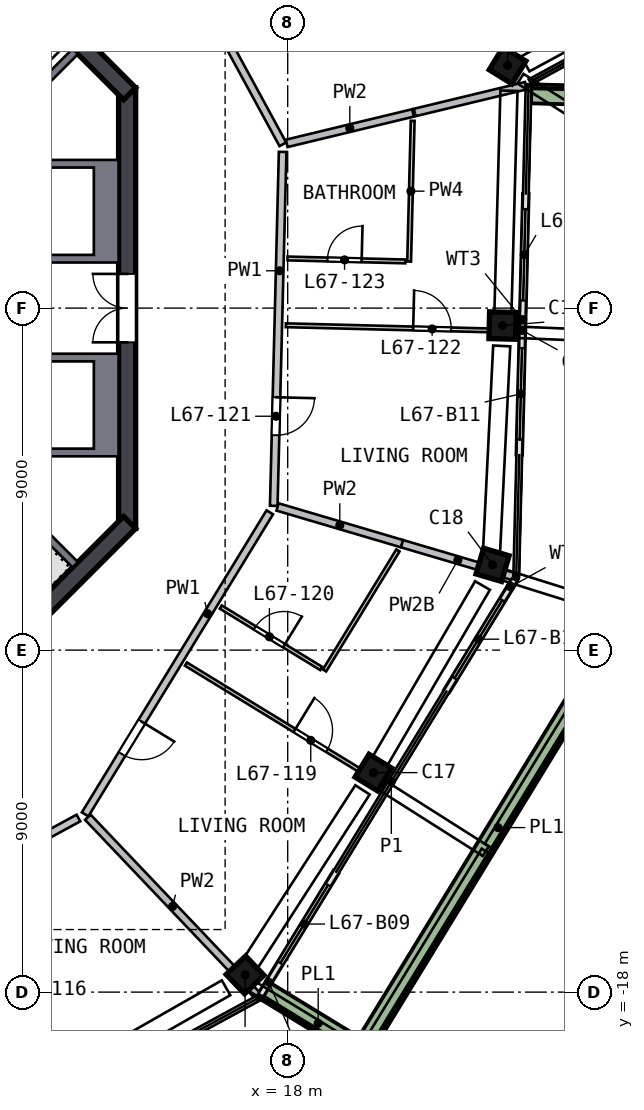
"""IFC4 building model, lengths in metres.
Left out: names, types, materials, properties, quantities, classifications, styles, units other than length and angle.
Written with IfcOpenShell. Run it as: python <this file> out.ifc"""

import sys

from ifc_helpers import new_model, si_unit, direction, frame, frame_2d, origin, origin_2d, place, context, subcontext, project, spatial, polyline, rectangle, outline, extrude, element, fill, save


model = new_model("IFC4")
c1 = context("Model", 3, precision=1e-05, world=origin(), true_north=direction((0.0, 1.0)))
c2 = subcontext(c1, "Body", "Model", "MODEL_VIEW")
j1 = project(units=[si_unit("LENGTHUNIT", "METRE"), si_unit("PLANEANGLEUNIT", "RADIAN")], contexts=[c1])
p1 = place(None, origin())
s1 = spatial("IfcSite", under=j1, at=p1, CompositionType="ELEMENT")
p2 = place(p1, origin())
s2 = spatial("IfcBuilding", under=s1, at=p2, CompositionType="ELEMENT")
p3 = place(p2, frame((0.0, 0.0, 274.0)))
s3 = spatial("IfcBuildingStorey", under=s2, at=p3, CompositionType="ELEMENT", Elevation=274.0)
p4 = place(p3, frame((16.779, -17.644, 0.0), z_axis=(0.083241987, 0.080429245, 0.993278364), x_axis=(-0.720153088, -0.684092384, 0.115746011)))
e1 = element("IfcColumn", 1, at=p4, inside=s3, PredefinedType="COLUMN", context=c2, shape_type="SweptSolid", body=[
    extrude(rectangle(XDim=0.7, YDim=0.7, at=origin_2d()), origin(), (0.0, 0.0, 1.0), 3.211),
])
p5 = place(p3, frame((20.185, -12.34, 0.0), z_axis=(0.057872841, 0.096505434, 0.993648547), x_axis=(0.518243304, 0.847798451, -0.112524062)))
e2 = element("IfcColumn", 2, at=p5, inside=s3, PredefinedType="COLUMN", context=c2, shape_type="SweptSolid", body=[
    extrude(rectangle(XDim=0.7, YDim=0.7, at=origin_2d()), origin(), (0.0, 0.0, 1.0), 3.21),
])
p6 = place(p3, frame((23.353, -6.891, 0.0), z_axis=(0.03185237, 0.111293246, 0.993277021), x_axis=(-0.281402991, -0.952582043, 0.115757536)))
e3 = element("IfcColumn", 3, at=p6, inside=s3, PredefinedType="COLUMN", context=c2, shape_type="SweptSolid", body=[
    extrude(rectangle(XDim=0.7, YDim=0.7, at=origin_2d()), origin(), (0.0, 0.0, 1.0), 3.211),
])
p7 = place(p3, frame((23.651, -0.594, 0.0), z_axis=(0.001901218, 0.112476061, 0.993652616), x_axis=(0.025223407, 0.993332875, -0.11248813)))
e4 = element("IfcColumn", 4, at=p7, inside=s3, PredefinedType="COLUMN", context=c2, shape_type="SweptSolid", body=[
    extrude(rectangle(XDim=0.7, YDim=0.7, at=origin_2d()), origin(), (0.0, 0.0, 1.0), 3.21),
])
p8 = place(p3, frame((23.823, 6.25, 0.0), z_axis=(-0.030707144, 0.113023573, 0.993117689), x_axis=(-0.525479684, -0.847022559, 0.080149147)))
e5 = element("IfcColumn", 5, at=p8, inside=s3, PredefinedType="COLUMN", context=c2, shape_type="SweptSolid", body=[
    extrude(rectangle(XDim=0.7, YDim=0.7, at=origin_2d()), origin(), (0.0, 0.0, 1.0), 3.212),
])
p9 = place(p3, frame((13.775, -5.799, 0.0), z_axis=(0.0, 0.0, 1.0), x_axis=(0.0, 1.0, 0.0)))
e6 = element("IfcWall", 6, at=p9, inside=s3, PredefinedType="SHEAR", context=c2, shape_type="SweptSolid", body=[
    extrude(rectangle(XDim=11.598, YDim=0.45, at=frame_2d((5.799, 0.0))), origin(), (0.0, 0.0, 1.0), 3.5),
])
p10 = place(p9, frame((4.899, 0.0, 0.0)))
e7 = element("IfcOpeningElement", 7, at=p10, cuts=e6, PredefinedType="OPENING", context=c2, shape_type="SweptSolid", body=[
    extrude(rectangle(XDim=1.8, YDim=2.1, at=frame_2d((0.9, 1.05))), frame((0.0, 0.235, 0.0), z_axis=(0.0, -1.0, 0.0), x_axis=(1.0, 0.0, 0.0)), (0.0, 0.0, 1.0), 0.47),
])
p11 = place(p3, frame((13.841, 5.64, 0.0), z_axis=(0.0, 0.0, 1.0), x_axis=(-0.707106781, 0.707106781, 0.0)))
e8 = element("IfcWall", 8, at=p11, inside=s3, PredefinedType="SHEAR", context=c2, shape_type="SweptSolid", body=[
    extrude(rectangle(XDim=11.598, YDim=0.45, at=frame_2d((5.799, 0.0))), origin(), (0.0, 0.0, 1.0), 3.5),
])
p12 = place(p11, frame((2.099, 0.0, 0.0)))
e9 = element("IfcOpeningElement", 9, at=p12, cuts=e8, PredefinedType="OPENING", context=c2, shape_type="SweptSolid", body=[
    extrude(rectangle(XDim=1.2, YDim=2.1, at=frame_2d((0.6, 1.05))), frame((0.0, 0.235, 0.0), z_axis=(0.0, -1.0, 0.0), x_axis=(1.0, 0.0, 0.0)), (0.0, 0.0, 1.0), 0.47),
])
p13 = place(p3, frame((5.64, -13.841, 0.0), z_axis=(0.0, 0.0, 1.0), x_axis=(0.707106781, 0.707106781, 0.0)))
e10 = element("IfcWall", 10, at=p13, inside=s3, PredefinedType="SHEAR", context=c2, shape_type="SweptSolid", body=[
    extrude(rectangle(XDim=11.598, YDim=0.45, at=frame_2d((5.799, 0.0))), origin(), (0.0, 0.0, 1.0), 3.5),
])
p14 = place(p13, frame((2.099, 0.0, 0.0)))
e11 = element("IfcOpeningElement", 11, at=p14, cuts=e10, PredefinedType="OPENING", context=c2, shape_type="SweptSolid", body=[
    extrude(rectangle(XDim=1.2, YDim=2.1, at=frame_2d((0.6, 1.05))), frame((0.0, 0.235, 0.0), z_axis=(0.0, -1.0, 0.0), x_axis=(1.0, 0.0, 0.0)), (0.0, 0.0, 1.0), 0.47),
])
p15 = place(p3, frame((17.295, -18.074, 0.0), z_axis=(0.0, 0.0, 1.0), x_axis=(0.521598655, 0.853190977, 0.0)))
e12 = element("IfcWall", 12, at=p15, inside=s3, PredefinedType="SOLIDWALL", context=c2, shape_type="SweptSolid", body=[
    extrude(rectangle(XDim=3.787, YDim=0.15, at=frame_2d((1.893, 0.0))), origin(), (0.0, 0.0, 1.0), 2.525),
])
p16 = place(p15, frame((0.987, 0.0, 0.0)))
e13 = element("IfcOpeningElement", 13, at=p16, cuts=e12, PredefinedType="OPENING", context=c2, shape_type="SweptSolid", body=[
    extrude(rectangle(XDim=2.4, YDim=2.4, at=frame_2d((1.2, 1.2))), frame((0.0, 0.085, 0.0), z_axis=(0.0, -1.0, 0.0), x_axis=(1.0, 0.0, 0.0)), (0.0, 0.0, 1.0), 0.17),
])
p17 = place(p3, frame((22.184, -10.078, 0.0), z_axis=(0.0, 0.0, 1.0), x_axis=(0.521622897, 0.853176156, 0.0)))
e14 = element("IfcWall", 14, at=p17, inside=s3, PredefinedType="SOLIDWALL", context=c2, shape_type="SweptSolid", body=[
    extrude(rectangle(XDim=3.427, YDim=0.15, at=frame_2d((1.713, 0.0))), origin(), (0.0, 0.0, 1.0), 2.525),
])
p18 = place(p17, frame((0.4, 0.0, 0.0)))
e15 = element("IfcOpeningElement", 15, at=p18, cuts=e14, PredefinedType="OPENING", context=c2, shape_type="SweptSolid", body=[
    extrude(rectangle(XDim=2.4, YDim=2.4, at=frame_2d((1.2, 1.2))), frame((0.0, 0.085, 0.0), z_axis=(0.0, -1.0, 0.0), x_axis=(1.0, 0.0, 0.0)), (0.0, 0.0, 1.0), 0.17),
])
p19 = place(p3, frame((24.094, -3.857, 0.0), z_axis=(0.0, 0.0, 1.0), x_axis=(0.025164857, 0.999683315, 0.0)))
e16 = element("IfcWall", 16, at=p19, inside=s3, PredefinedType="SOLIDWALL", context=c2, shape_type="SweptSolid", body=[
    extrude(rectangle(XDim=3.25, YDim=0.15, at=frame_2d((1.625, 0.0))), origin(), (0.0, 0.0, 1.0), 2.525),
])
p20 = place(p19, frame((0.4, 0.0, 0.0)))
e17 = element("IfcOpeningElement", 17, at=p20, cuts=e16, PredefinedType="OPENING", context=c2, shape_type="SweptSolid", body=[
    extrude(rectangle(XDim=2.4, YDim=2.4, at=frame_2d((1.2, 1.2))), frame((0.0, 0.085, 0.0), z_axis=(0.0, -1.0, 0.0), x_axis=(1.0, 0.0, 0.0)), (0.0, 0.0, 1.0), 0.17),
])
p21 = place(p3, frame((24.176, -0.608, 0.0), z_axis=(0.0, 0.0, 1.0), x_axis=(0.025081713, 0.999685404, 0.0)))
e18 = element("IfcWall", 18, at=p21, inside=s3, PredefinedType="SOLIDWALL", context=c2, shape_type="SweptSolid", body=[
    extrude(rectangle(XDim=3.611, YDim=0.15, at=frame_2d((1.806, 0.0))), origin(), (0.0, 0.0, 1.0), 2.525),
])
p22 = place(p21, frame((0.811, 0.0, 0.0)))
e19 = element("IfcOpeningElement", 19, at=p22, cuts=e18, PredefinedType="OPENING", context=c2, shape_type="SweptSolid", body=[
    extrude(rectangle(XDim=2.4, YDim=2.4, at=frame_2d((1.2, 1.2))), frame((0.0, 0.085, 0.0), z_axis=(0.0, -1.0, 0.0), x_axis=(1.0, 0.0, 0.0)), (0.0, 0.0, 1.0), 0.17),
])
p23 = place(p3, frame((17.438, -17.986, 0.0), z_axis=(0.0, 0.0, 1.0), x_axis=(0.853200699, -0.521582752, 0.0)))
e20 = element("IfcWall", 20, at=p23, inside=s3, PredefinedType="SOLIDWALL", context=c2, shape_type="SweptSolid", body=[
    extrude(rectangle(XDim=3.199, YDim=0.5, at=frame_2d((1.599, 0.0))), origin(), (0.0, 0.0, 1.0), 0.7),
])
p24 = place(p3, frame((20.084, -19.311, 0.0), z_axis=(0.0, 0.0, 1.0), x_axis=(0.521610564, 0.853183696, 0.0)))
e21 = element("IfcWall", 21, at=p24, inside=s3, PredefinedType="SOLIDWALL", context=c2, shape_type="SweptSolid", body=[
    extrude(rectangle(XDim=13.223, YDim=0.5, at=frame_2d((6.612, 0.0))), origin(), (0.0, 0.0, 1.0), 0.7),
])
p25 = place(p3, frame((27.107, 5.571, 0.0), z_axis=(0.0, 0.0, 1.0), x_axis=(-0.999683793, 0.025145864, 0.0)))
e22 = element("IfcWall", 22, at=p25, inside=s3, PredefinedType="SOLIDWALL", context=c2, shape_type="SweptSolid", body=[
    extrude(rectangle(XDim=2.699, YDim=0.5, at=frame_2d((1.35, 0.0))), origin(), (0.0, 0.0, 1.0), 0.7),
])
p26 = place(p3, origin())
e23 = element("IfcWall", 23, at=p26, inside=s3, PredefinedType="SOLIDWALL", context=c2, shape_type="SweptSolid", body=[
    extrude(outline(polyline([(13.55, -3.9), (9.9, -3.9), (9.9, -3.7), (12.9, -3.7), (12.9, -1.4), (9.9, -1.4), (9.9, -1.2), (13.55, -1.2), (13.55, -3.9)])), origin(), (0.0, 0.0, 1.0), 3.19),
])
p27 = place(p3, origin())
e24 = element("IfcWall", 24, at=p27, inside=s3, PredefinedType="SOLIDWALL", context=c2, shape_type="SweptSolid", body=[
    extrude(outline(polyline([(13.55, 3.9), (13.55, 1.2), (9.9, 1.2), (9.9, 1.4), (12.9, 1.4), (12.9, 3.7), (9.9, 3.7), (9.9, 3.9), (13.55, 3.9)])), origin(), (0.0, 0.0, 1.0), 3.19),
])
for number, where, z_axis, x_axis in (
    (25, (9.334, 3.677, 0.0), (0.0, 0.0, 1.0), (0.707, 0.707, 0.0)),
    (26, (9.334, -3.677, 0.0), (0.0, 0.0, 1.0), (0.707, -0.707, 0.0)),
):
    element("IfcWall", number, at=place(p3, frame(where, z_axis=z_axis, x_axis=x_axis)), inside=s3, PredefinedType="SOLIDWALL", context=c2, shape_type="SweptSolid", body=[
        extrude(rectangle(XDim=4.35, YDim=0.2, at=frame_2d((2.175, 0.0))), origin(), (0.0, 0.0, 1.0), 3.19),
    ])
p28 = place(p3, frame((12.493, -13.418, 0.0), z_axis=(0.0, 0.0, 1.0), x_axis=(-0.878320972, -0.478071407, 0.0)))
e27 = element("IfcWall", 27, at=p28, inside=s3, PredefinedType="SOLIDWALL", context=c2, shape_type="SweptSolid", body=[
    extrude(rectangle(XDim=9.117, YDim=0.2, at=frame_2d((4.558, 0.0))), origin(), (0.0, 0.0, 1.0), 3.19),
])
p29 = place(p28, frame((1.7, 0.0, 0.0)))
e28 = element("IfcOpeningElement", 28, at=p29, cuts=e27, PredefinedType="OPENING", context=c2, shape_type="SweptSolid", body=[
    extrude(rectangle(XDim=1.0, YDim=2.1, at=frame_2d((0.5, 1.05))), frame((0.0, 0.11, 0.0), z_axis=(0.0, -1.0, 0.0), x_axis=(1.0, 0.0, 0.0)), (0.0, 0.0, 1.0), 0.22),
])
p30 = place(p3, frame((17.529, -5.374, 0.0), z_axis=(0.0, 0.0, 1.0), x_axis=(-0.521611117, -0.853183358, 0.0)))
e29 = element("IfcWall", 29, at=p30, inside=s3, PredefinedType="SOLIDWALL", context=c2, shape_type="SweptSolid", body=[
    extrude(rectangle(XDim=9.317, YDim=0.2, at=frame_2d((4.658, 0.0))), origin(), (0.0, 0.0, 1.0), 3.19),
])
p31 = place(p30, frame((6.458, 0.0, 0.0)))
e30 = element("IfcOpeningElement", 30, at=p31, cuts=e29, PredefinedType="OPENING", context=c2, shape_type="SweptSolid", body=[
    extrude(rectangle(XDim=1.0, YDim=2.1, at=frame_2d((0.5, 1.05))), frame((0.0, 0.11, 0.0), z_axis=(0.0, -1.0, 0.0), x_axis=(1.0, 0.0, 0.0)), (0.0, 0.0, 1.0), 0.22),
])
p32 = place(p3, frame((13.323, 12.669, 0.0), z_axis=(0.0, 0.0, 1.0), x_axis=(0.478086253, -0.878312891, 0.0)))
e31 = element("IfcWall", 31, at=p32, inside=s3, PredefinedType="SOLIDWALL", context=c2, shape_type="SweptSolid", body=[
    extrude(rectangle(XDim=9.517, YDim=0.2, at=frame_2d((4.758, 0.0))), origin(), (0.0, 0.0, 1.0), 3.19),
])
p33 = place(p32, frame((3.869, 0.0, 0.0)))
e32 = element("IfcOpeningElement", 32, at=p33, cuts=e31, PredefinedType="OPENING", context=c2, shape_type="SweptSolid", body=[
    extrude(rectangle(XDim=1.8, YDim=2.1, at=frame_2d((0.9, 1.05))), frame((0.0, 0.11, 0.0), z_axis=(0.0, -1.0, 0.0), x_axis=(1.0, 0.0, 0.0)), (0.0, 0.0, 1.0), 0.22),
])
p34 = place(p3, frame((17.867, 4.111, 0.0), z_axis=(0.0, 0.0, 1.0), x_axis=(-0.025130335, -0.999684183, 0.0)))
e33 = element("IfcWall", 33, at=p34, inside=s3, PredefinedType="SOLIDWALL", context=c2, shape_type="SweptSolid", body=[
    extrude(rectangle(XDim=9.317, YDim=0.2, at=frame_2d((4.658, 0.0))), origin(), (0.0, 0.0, 1.0), 3.19),
])
p35 = place(p34, frame((6.458, 0.0, 0.0)))
e34 = element("IfcOpeningElement", 34, at=p35, cuts=e33, PredefinedType="OPENING", context=c2, shape_type="SweptSolid", body=[
    extrude(rectangle(XDim=1.0, YDim=2.1, at=frame_2d((0.5, 1.05))), frame((0.0, 0.11, 0.0), z_axis=(0.0, -1.0, 0.0), x_axis=(1.0, 0.0, 0.0)), (0.0, 0.0, 1.0), 0.22),
])
p36 = place(p3, frame((12.74, -13.398, 0.0), z_axis=(0.0, 0.0, 1.0), x_axis=(0.689126869, -0.72464071, 0.0)))
e35 = element("IfcWall", 35, at=p36, inside=s3, PredefinedType="SOLIDWALL", context=c2, shape_type="SweptSolid", body=[
    extrude(rectangle(XDim=6.476, YDim=0.2, at=frame_2d((3.238, 0.0))), origin(), (0.0, 0.0, 1.0), 3.19),
])
p37 = place(p3, frame((17.732, -5.232, 0.0), z_axis=(0.0, 0.0, 1.0), x_axis=(0.959126201, -0.282978674, 0.0)))
e36 = element("IfcWall", 36, at=p37, inside=s3, PredefinedType="SOLIDWALL", context=c2, shape_type="SweptSolid", body=[
    extrude(rectangle(XDim=3.417, YDim=0.2, at=frame_2d((1.708, 0.0))), origin(), (0.0, 0.0, 1.0), 3.19),
])
p38 = place(p3, frame((21.296, 5.136, 0.0), z_axis=(0.0, 0.0, 1.0), x_axis=(-0.972125443, -0.234461345, 0.0)))
e37 = element("IfcWall", 37, at=p38, inside=s3, PredefinedType="SOLIDWALL", context=c2, shape_type="SweptSolid", body=[
    extrude(rectangle(XDim=3.418, YDim=0.2, at=frame_2d((1.709, 0.0))), origin(), (0.0, 0.0, 1.0), 3.19),
])
p39 = place(p3, frame((21.009, -6.199, 0.0), z_axis=(0.0, 0.0, 1.0), x_axis=(0.959105877, -0.283047553, 0.0)))
e38 = element("IfcWall", 38, at=p39, inside=s3, PredefinedType="SOLIDWALL", context=c2, shape_type="SweptSolid", body=[
    extrude(rectangle(XDim=3.059, YDim=0.2, at=frame_2d((1.53, 0.0))), origin(), (0.0, 0.0, 1.0), 2.69),
])
p40 = place(p3, frame((24.268, 5.853, 0.0), z_axis=(0.0, 0.0, 1.0), x_axis=(-0.972126189, -0.234458255, 0.0)))
e39 = element("IfcWall", 39, at=p40, inside=s3, PredefinedType="SOLIDWALL", context=c2, shape_type="SweptSolid", body=[
    extrude(rectangle(XDim=3.011, YDim=0.2, at=frame_2d((1.506, 0.0))), origin(), (0.0, 0.0, 1.0), 3.19),
])
p41 = place(p3, frame((16.239, -7.867, 0.0), z_axis=(0.0, 0.0, 1.0), x_axis=(0.85318253, -0.521612471, 0.0)))
e40 = element("IfcWall", 40, at=p41, inside=s3, PredefinedType="PARTITIONING", context=c2, shape_type="SweptSolid", body=[
    extrude(rectangle(XDim=3.1, YDim=0.1, at=frame_2d((1.55, 0.0))), origin(), (0.0, 0.0, 1.0), 3.19),
])
p42 = place(p41, frame((1.05, 0.0, 0.0)))
e41 = element("IfcOpeningElement", 41, at=p42, cuts=e40, PredefinedType="OPENING", context=c2, shape_type="SweptSolid", body=[
    extrude(rectangle(XDim=0.9, YDim=2.1, at=frame_2d((0.45, 1.05))), frame((0.0, 0.06, 0.0), z_axis=(0.0, -1.0, 0.0), x_axis=(1.0, 0.0, 0.0)), (0.0, 0.0, 1.0), 0.12),
])
p43 = place(p3, frame((15.322, -9.367, 0.0), z_axis=(0.0, 0.0, 1.0), x_axis=(0.853193504, -0.521594521, 0.0)))
e42 = element("IfcWall", 42, at=p43, inside=s3, PredefinedType="PARTITIONING", context=c2, shape_type="SweptSolid", body=[
    extrude(rectangle(XDim=6.15, YDim=0.1, at=frame_2d((3.075, 0.0))), origin(), (0.0, 0.0, 1.0), 3.19),
])
p44 = place(p43, frame((3.35, 0.0, 0.0)))
e43 = element("IfcOpeningElement", 43, at=p44, cuts=e42, PredefinedType="OPENING", context=c2, shape_type="SweptSolid", body=[
    extrude(rectangle(XDim=1.0, YDim=2.1, at=frame_2d((0.5, 1.05))), frame((0.0, 0.06, 0.0), z_axis=(0.0, -1.0, 0.0), x_axis=(1.0, 0.0, 0.0)), (0.0, 0.0, 1.0), 0.12),
])
p45 = place(p3, frame((17.997, 1.306, 0.0), z_axis=(0.0, 0.0, 1.0), x_axis=(0.999684391, -0.025122051, 0.0)))
e44 = element("IfcWall", 44, at=p45, inside=s3, PredefinedType="PARTITIONING", context=c2, shape_type="SweptSolid", body=[
    extrude(rectangle(XDim=3.1, YDim=0.1, at=frame_2d((1.55, 0.0))), origin(), (0.0, 0.0, 1.0), 3.19),
])
p46 = place(p45, frame((1.05, 0.0, 0.0)))
e45 = element("IfcOpeningElement", 45, at=p46, cuts=e44, PredefinedType="OPENING", context=c2, shape_type="SweptSolid", body=[
    extrude(rectangle(XDim=0.9, YDim=2.1, at=frame_2d((0.45, 1.05))), frame((0.0, 0.06, 0.0), z_axis=(0.0, -1.0, 0.0), x_axis=(1.0, 0.0, 0.0)), (0.0, 0.0, 1.0), 0.12),
])
p47 = place(p3, frame((18.969, -9.536, 0.0), z_axis=(0.0, 0.0, 1.0), x_axis=(0.521583314, 0.853200356, 0.0)))
e46 = element("IfcWall", 46, at=p47, inside=s3, PredefinedType="PARTITIONING", context=c2, shape_type="SweptSolid", body=[
    extrude(rectangle(XDim=3.704, YDim=0.1, at=frame_2d((1.852, 0.0))), origin(), (0.0, 0.0, 1.0), 3.19),
])
p48 = place(p3, frame((17.953, -0.451, 0.0), z_axis=(0.0, 0.0, 1.0), x_axis=(0.999685212, -0.025089391, 0.0)))
e47 = element("IfcWall", 47, at=p48, inside=s3, PredefinedType="PARTITIONING", context=c2, shape_type="SweptSolid", body=[
    extrude(rectangle(XDim=6.15, YDim=0.1, at=frame_2d((3.075, 0.0))), origin(), (0.0, 0.0, 1.0), 3.19),
])
p49 = place(p48, frame((3.35, 0.0, 0.0)))
e48 = element("IfcOpeningElement", 48, at=p49, cuts=e47, PredefinedType="OPENING", context=c2, shape_type="SweptSolid", body=[
    extrude(rectangle(XDim=1.0, YDim=2.1, at=frame_2d((0.5, 1.05))), frame((0.0, 0.06, 0.0), z_axis=(0.0, -1.0, 0.0), x_axis=(1.0, 0.0, 0.0)), (0.0, 0.0, 1.0), 0.12),
])
p50 = place(p3, frame((21.196, 1.226, 0.0), z_axis=(0.0, 0.0, 1.0), x_axis=(0.025112405, 0.999684634, 0.0)))
e49 = element("IfcWall", 49, at=p50, inside=s3, PredefinedType="PARTITIONING", context=c2, shape_type="SweptSolid", body=[
    extrude(rectangle(XDim=3.704, YDim=0.1, at=frame_2d((1.852, 0.0))), origin(), (0.0, 0.0, 1.0), 3.19),
])
p51 = place(p16, origin())
e50 = element("IfcDoor", 50, at=p51, inside=s3, OperationType="SLIDING_TO_LEFT", PredefinedType="DOOR", context=c2, shape_type="SweptSolid", body=[
    extrude(rectangle(XDim=2.4, YDim=2.4, at=frame_2d((1.2, 1.2))), frame((0.0, 0.025, 0.0), z_axis=(0.0, -1.0, 0.0), x_axis=(1.0, 0.0, 0.0)), (0.0, 0.0, 1.0), 0.05),
])
fill(e13, e50)
p52 = place(p18, origin())
e51 = element("IfcDoor", 51, at=p52, inside=s3, OperationType="SLIDING_TO_RIGHT", PredefinedType="DOOR", context=c2, shape_type="SweptSolid", body=[
    extrude(rectangle(XDim=2.4, YDim=2.4, at=frame_2d((1.2, 1.2))), frame((0.0, 0.025, 0.0), z_axis=(0.0, -1.0, 0.0), x_axis=(1.0, 0.0, 0.0)), (0.0, 0.0, 1.0), 0.05),
])
fill(e15, e51)
p53 = place(p20, origin())
e52 = element("IfcDoor", 52, at=p53, inside=s3, OperationType="SLIDING_TO_RIGHT", PredefinedType="DOOR", context=c2, shape_type="SweptSolid", body=[
    extrude(rectangle(XDim=2.4, YDim=2.4, at=frame_2d((1.2, 1.2))), frame((0.0, 0.025, 0.0), z_axis=(0.0, -1.0, 0.0), x_axis=(1.0, 0.0, 0.0)), (0.0, 0.0, 1.0), 0.05),
])
fill(e17, e52)
p54 = place(p22, origin())
e53 = element("IfcDoor", 53, at=p54, inside=s3, OperationType="SLIDING_TO_LEFT", PredefinedType="DOOR", context=c2, shape_type="SweptSolid", body=[
    extrude(rectangle(XDim=2.4, YDim=2.4, at=frame_2d((1.2, 1.2))), frame((0.0, 0.025, 0.0), z_axis=(0.0, -1.0, 0.0), x_axis=(1.0, 0.0, 0.0)), (0.0, 0.0, 1.0), 0.05),
])
fill(e19, e53)
p55 = place(p10, origin())
e54 = element("IfcDoor", 54, at=p55, inside=s3, OperationType="DOUBLE_DOOR_SINGLE_SWING", PredefinedType="DOOR", context=c2, shape_type="SweptSolid", body=[
    extrude(rectangle(XDim=1.8, YDim=2.1, at=frame_2d((0.9, 1.05))), frame((0.0, 0.025, 0.0), z_axis=(0.0, -1.0, 0.0), x_axis=(1.0, 0.0, 0.0)), (0.0, 0.0, 1.0), 0.05),
])
fill(e7, e54)
p56 = place(p31, origin())
e55 = element("IfcDoor", 55, at=p56, inside=s3, OperationType="SINGLE_SWING_LEFT", PredefinedType="DOOR", context=c2, shape_type="SweptSolid", body=[
    extrude(rectangle(XDim=1.0, YDim=2.1, at=frame_2d((0.5, 1.05))), frame((0.0, 0.025, 0.0), z_axis=(0.0, -1.0, 0.0), x_axis=(1.0, 0.0, 0.0)), (0.0, 0.0, 1.0), 0.05),
])
fill(e30, e55)
p57 = place(p44, origin())
e56 = element("IfcDoor", 56, at=p57, inside=s3, OperationType="SINGLE_SWING_LEFT", PredefinedType="DOOR", context=c2, shape_type="SweptSolid", body=[
    extrude(rectangle(XDim=1.0, YDim=2.1, at=frame_2d((0.5, 1.05))), frame((0.0, 0.025, 0.0), z_axis=(0.0, -1.0, 0.0), x_axis=(1.0, 0.0, 0.0)), (0.0, 0.0, 1.0), 0.05),
])
fill(e43, e56)
p58 = place(p42, origin())
e57 = element("IfcDoor", 57, at=p58, inside=s3, OperationType="SINGLE_SWING_RIGHT", PredefinedType="DOOR", context=c2, shape_type="SweptSolid", body=[
    extrude(rectangle(XDim=0.9, YDim=2.1, at=frame_2d((0.45, 1.05))), frame((0.0, 0.025, 0.0), z_axis=(0.0, -1.0, 0.0), x_axis=(1.0, 0.0, 0.0)), (0.0, 0.0, 1.0), 0.05),
])
fill(e41, e57)
p59 = place(p35, origin())
e58 = element("IfcDoor", 58, at=p59, inside=s3, OperationType="SINGLE_SWING_LEFT", PredefinedType="DOOR", context=c2, shape_type="SweptSolid", body=[
    extrude(rectangle(XDim=1.0, YDim=2.1, at=frame_2d((0.5, 1.05))), frame((0.0, 0.025, 0.0), z_axis=(0.0, -1.0, 0.0), x_axis=(1.0, 0.0, 0.0)), (0.0, 0.0, 1.0), 0.05),
])
fill(e34, e58)
p60 = place(p49, origin())
e59 = element("IfcDoor", 59, at=p60, inside=s3, OperationType="SINGLE_SWING_LEFT", PredefinedType="DOOR", context=c2, shape_type="SweptSolid", body=[
    extrude(rectangle(XDim=1.0, YDim=2.1, at=frame_2d((0.5, 1.05))), frame((0.0, 0.025, 0.0), z_axis=(0.0, -1.0, 0.0), x_axis=(1.0, 0.0, 0.0)), (0.0, 0.0, 1.0), 0.05),
])
fill(e48, e59)
p61 = place(p46, origin())
e60 = element("IfcDoor", 60, at=p61, inside=s3, OperationType="SINGLE_SWING_RIGHT", PredefinedType="DOOR", context=c2, shape_type="SweptSolid", body=[
    extrude(rectangle(XDim=0.9, YDim=2.1, at=frame_2d((0.45, 1.05))), frame((0.0, 0.025, 0.0), z_axis=(0.0, -1.0, 0.0), x_axis=(1.0, 0.0, 0.0)), (0.0, 0.0, 1.0), 0.05),
])
fill(e45, e60)
save(model, sys.argv[1])
